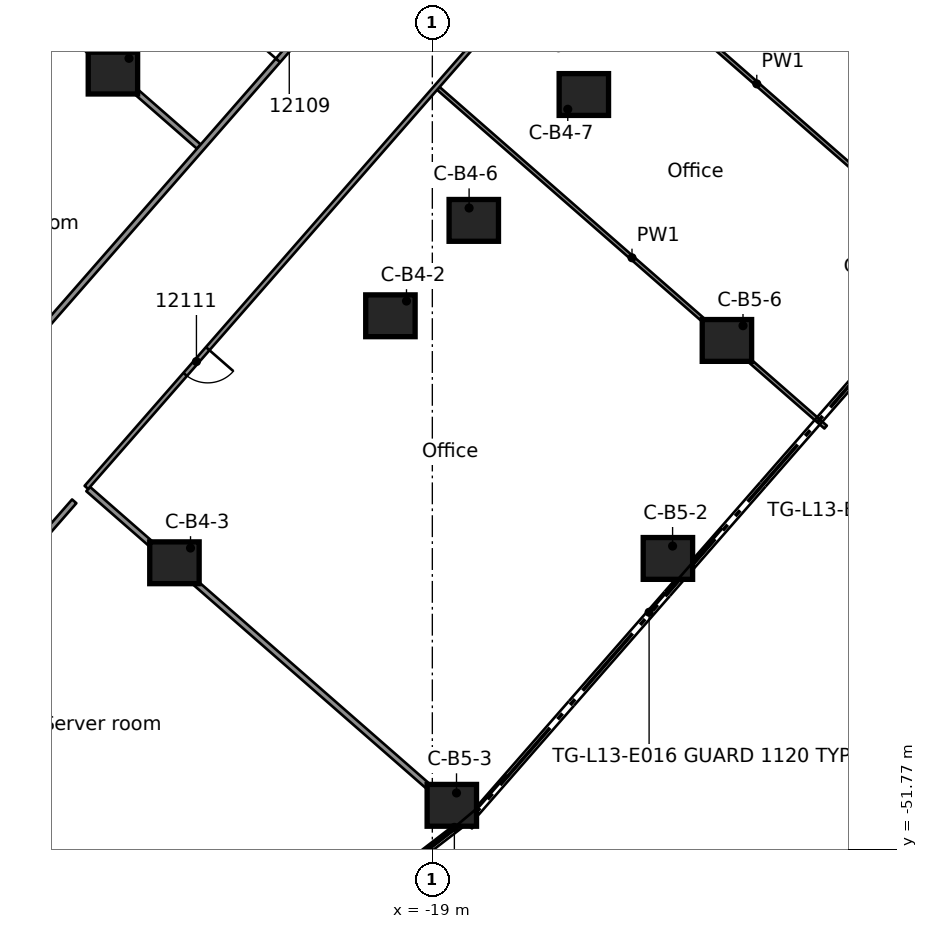
"""IFC4 building model, lengths in metres.
Left out: names, types, materials, properties, quantities, classifications, styles, units other than length and angle.
Written with IfcOpenShell. Run it as: python <this file> out.ifc"""

import sys

from ifc_helpers import new_model, si_unit, direction, frame, frame_2d, origin, origin_2d, place, context, subcontext, project, spatial, rectangle, extrude, element, fill, save


model = new_model("IFC4")
c1 = context("Model", 3, precision=1e-05, world=origin(), true_north=direction((0.0, 1.0)))
c2 = subcontext(c1, "Body", "Model", "MODEL_VIEW")
j1 = project(units=[si_unit("LENGTHUNIT", "METRE"), si_unit("PLANEANGLEUNIT", "RADIAN")], contexts=[c1])
p1 = place(None, origin())
s1 = spatial("IfcSite", under=j1, at=p1, CompositionType="ELEMENT")
p2 = place(p1, origin())
s2 = spatial("IfcBuilding", under=s1, at=p2, CompositionType="ELEMENT")
p3 = place(p2, frame((0.0, 0.0, 58.8)))
s3 = spatial("IfcBuildingStorey", under=s2, at=p3, CompositionType="ELEMENT", Elevation=58.8)
for number, where, z_axis, x_axis in (
    (1, (-27.405, -31.341, 0.0), (0.0, 0.0, 1.0), (1.0, 0.0, 0.0)),
    (2, (-20.103, -37.727, 0.0), (0.0, 0.0, 1.0), (1.0, 0.0, 0.0)),
    (3, (-25.786, -44.226, 0.0), (0.0, 0.0, 1.0), (1.0, 0.0, 0.0)),
    (4, (-17.909, -35.217, 0.0), (0.0, 0.0, 1.0), (1.0, 0.0, 0.0)),
    (5, (-15.013, -31.905, 0.0), (0.0, 0.0, 1.0), (1.0, 0.0, 0.0)),
    (6, (-12.801, -44.112, 0.0), (0.0, 0.0, 1.0), (1.0, 0.0, 0.0)),
    (7, (-18.487, -50.608, 0.0), (0.0, 0.0, 1.0), (1.0, 0.0, 0.0)),
    (8, (-11.248, -38.376, 0.0), (0.0, 0.0, 1.0), (1.0, 0.0, 0.0)),
):
    element("IfcColumn", number, at=place(p3, frame(where, z_axis=z_axis, x_axis=x_axis)), inside=s3, PredefinedType="COLUMN", context=c2, shape_type="SweptSolid", body=[
        extrude(rectangle(XDim=1.3, YDim=1.1, at=origin_2d()), origin(), (0.0, 0.0, 1.0), 3.5),
    ])
p4 = place(p3, frame((-28.056, -42.286, 0.0), z_axis=(0.0, 0.0, 1.0), x_axis=(0.752776355168, -0.658276354656, 0.0)))
e9 = element("IfcWall", 9, at=p4, inside=s3, PredefinedType="PARTITIONING", context=c2, shape_type="SweptSolid", body=[
    extrude(rectangle(XDim=13.481, YDim=0.15, at=frame_2d((6.74, 0.0))), origin(), (0.0, 0.0, 1.0), 3.08),
])
p5 = place(p3, frame((-29.623, -29.358, 0.0), z_axis=(0.0, 0.0, 1.0), x_axis=(0.75275458924, -0.6583012444, 0.0)))
e10 = element("IfcWall", 10, at=p5, inside=s3, PredefinedType="PARTITIONING", context=c2, shape_type="SweptSolid", body=[
    extrude(rectangle(XDim=5.95, YDim=0.15, at=frame_2d((2.975, 0.0))), origin(), (0.0, 0.0, 1.0), 3.08),
])
p6 = place(p3, frame((-18.841, -31.745, 0.0), z_axis=(0.0, 0.0, 1.0), x_axis=(0.752778878966, -0.65827346854, 0.0)))
e11 = element("IfcWall", 11, at=p6, inside=s3, PredefinedType="PARTITIONING", context=c2, shape_type="SweptSolid", body=[
    extrude(rectangle(XDim=13.537, YDim=0.1, at=frame_2d((6.769, 0.0))), origin(), (0.0, 0.0, 1.0), 3.08),
])
p7 = place(p3, frame((-15.359, -27.343, 0.0), z_axis=(0.0, 0.0, 1.0), x_axis=(0.752799867841, -0.658249465612, 0.0)))
e12 = element("IfcWall", 12, at=p7, inside=s3, PredefinedType="PARTITIONING", context=c2, shape_type="SweptSolid", body=[
    extrude(rectangle(XDim=13.009, YDim=0.1, at=frame_2d((6.504, 0.0))), origin(), (0.0, 0.0, 1.0), 3.08),
])
p8 = place(p3, frame((-31.724, -46.384, 0.0), z_axis=(0.0, 0.0, 1.0), x_axis=(0.65825296656, 0.752796806592, 0.0)))
e13 = element("IfcWall", 13, at=p8, inside=s3, PredefinedType="PARTITIONING", context=c2, shape_type="SweptSolid", body=[
    extrude(rectangle(XDim=5.015, YDim=0.15, at=frame_2d((2.507, 0.0))), origin(), (0.0, 0.0, 1.0), 3.08),
])
p9 = place(p3, frame((-15.416, -27.733, 0.0), z_axis=(0.0, 0.0, 1.0), x_axis=(-0.658232849435, -0.75281439673, 0.0)))
e14 = element("IfcWall", 14, at=p9, inside=s3, PredefinedType="PARTITIONING", context=c2, shape_type="SweptSolid", body=[
    extrude(rectangle(XDim=19.274, YDim=0.125, at=frame_2d((9.637, 0.0))), origin(), (0.0, 0.0, 1.0), 3.08),
])
p10 = place(p9, frame((1.351, 0.0, 0.0)))
e15 = element("IfcOpeningElement", 15, at=p10, cuts=e14, PredefinedType="OPENING", context=c2, shape_type="SweptSolid", body=[
    extrude(rectangle(XDim=0.9, YDim=2.1, at=frame_2d((0.45, 1.05))), frame((0.0, 0.073, 0.0), z_axis=(0.0, -1.0, 0.0), x_axis=(1.0, 0.0, 0.0)), (0.0, 0.0, 1.0), 0.145),
])
p11 = place(p9, frame((14.425, 0.0, 0.0)))
e16 = element("IfcOpeningElement", 16, at=p11, cuts=e14, PredefinedType="OPENING", context=c2, shape_type="SweptSolid", body=[
    extrude(rectangle(XDim=0.9, YDim=2.1, at=frame_2d((0.45, 1.05))), frame((0.0, 0.073, 0.0), z_axis=(0.0, -1.0, 0.0), x_axis=(1.0, 0.0, 0.0)), (0.0, 0.0, 1.0), 0.145),
])
p12 = place(p3, frame((-30.815, -39.873, 0.0), z_axis=(0.0, 0.0, 1.0), x_axis=(0.658330873818, 0.752728676601, 0.0)))
e17 = element("IfcWall", 17, at=p12, inside=s3, PredefinedType="PARTITIONING", context=c2, shape_type="SweptSolid", body=[
    extrude(rectangle(XDim=18.805, YDim=0.15, at=frame_2d((9.402, 0.0))), origin(), (0.0, 0.0, 1.0), 3.08),
])
p13 = place(p12, frame((11.778, 0.0, 0.0)))
e18 = element("IfcOpeningElement", 18, at=p13, cuts=e17, PredefinedType="OPENING", context=c2, shape_type="SweptSolid", body=[
    extrude(rectangle(XDim=0.9, YDim=2.1, at=frame_2d((0.45, 1.05))), frame((0.0, 0.085, 0.0), z_axis=(0.0, -1.0, 0.0), x_axis=(1.0, 0.0, 0.0)), (0.0, 0.0, 1.0), 0.17),
])
p14 = place(p3, frame((-22.501, -21.097, 0.0), z_axis=(0.0, 0.0, 1.0), x_axis=(-0.658166451888, -0.752872447104, 0.0)))
e19 = element("IfcWall", 19, at=p14, inside=s3, PredefinedType="PARTITIONING", context=c2, shape_type="SweptSolid", body=[
    extrude(rectangle(XDim=19.427, YDim=0.15, at=frame_2d((9.713, 0.0))), origin(), (0.0, 0.0, 1.0), 3.08),
])
p15 = place(p14, frame((2.35, 0.0, 0.0)))
e20 = element("IfcOpeningElement", 20, at=p15, cuts=e19, PredefinedType="OPENING", context=c2, shape_type="SweptSolid", body=[
    extrude(rectangle(XDim=0.9, YDim=2.1, at=frame_2d((0.45, 1.05))), frame((0.0, 0.085, 0.0), z_axis=(0.0, -1.0, 0.0), x_axis=(1.0, 0.0, 0.0)), (0.0, 0.0, 1.0), 0.17),
])
p16 = place(p14, frame((14.757, 0.0, 0.0)))
e21 = element("IfcOpeningElement", 21, at=p16, cuts=e19, PredefinedType="OPENING", context=c2, shape_type="SweptSolid", body=[
    extrude(rectangle(XDim=0.9, YDim=2.1, at=frame_2d((0.45, 1.05))), frame((0.0, 0.085, 0.0), z_axis=(0.0, -1.0, 0.0), x_axis=(1.0, 0.0, 0.0)), (0.0, 0.0, 1.0), 0.17),
])
p17 = place(p3, frame((-41.737, -37.628, 0.0), z_axis=(0.0, 0.0, 1.0), x_axis=(0.658317287272, 0.752740559076, 0.0)))
e22 = element("IfcWall", 22, at=p17, inside=s3, PredefinedType="PARTITIONING", context=c2, shape_type="SweptSolid", body=[
    extrude(rectangle(XDim=23.255, YDim=0.125, at=frame_2d((11.627, 0.0))), origin(), (0.0, 0.0, 1.0), 3.08),
])
p18 = place(p17, frame((16.778, 0.0, 0.0)))
e23 = element("IfcOpeningElement", 23, at=p18, cuts=e22, PredefinedType="OPENING", context=c2, shape_type="SweptSolid", body=[
    extrude(rectangle(XDim=1.8, YDim=2.1, at=frame_2d((0.9, 1.05))), frame((0.0, 0.073, 0.0), z_axis=(0.0, -1.0, 0.0), x_axis=(1.0, 0.0, 0.0)), (0.0, 0.0, 1.0), 0.145),
])
p19 = place(p17, frame((9.35, 0.0, 0.0)))
e24 = element("IfcOpeningElement", 24, at=p19, cuts=e22, PredefinedType="OPENING", context=c2, shape_type="SweptSolid", body=[
    extrude(rectangle(XDim=1.1, YDim=2.1, at=frame_2d((0.55, 1.05))), frame((0.0, 0.073, 0.0), z_axis=(0.0, -1.0, 0.0), x_axis=(1.0, 0.0, 0.0)), (0.0, 0.0, 1.0), 0.145),
])
p20 = place(p13, origin())
e25 = element("IfcDoor", 25, at=p20, inside=s3, OperationType="SINGLE_SWING_RIGHT", PredefinedType="DOOR", context=c2, shape_type="SweptSolid", body=[
    extrude(rectangle(XDim=0.9, YDim=2.1, at=frame_2d((0.45, 1.05))), frame((0.0, 0.025, 0.0), z_axis=(0.0, -1.0, 0.0), x_axis=(1.0, 0.0, 0.0)), (0.0, 0.0, 1.0), 0.05),
])
fill(e18, e25)
p21 = place(p11, origin())
e26 = element("IfcDoor", 26, at=p21, inside=s3, OperationType="SINGLE_SWING_RIGHT", PredefinedType="DOOR", context=c2, shape_type="SweptSolid", body=[
    extrude(rectangle(XDim=0.9, YDim=2.1, at=frame_2d((0.45, 1.05))), frame((0.0, 0.025, 0.0), z_axis=(0.0, -1.0, 0.0), x_axis=(1.0, 0.0, 0.0)), (0.0, 0.0, 1.0), 0.05),
])
fill(e16, e26)
save(model, sys.argv[1])
